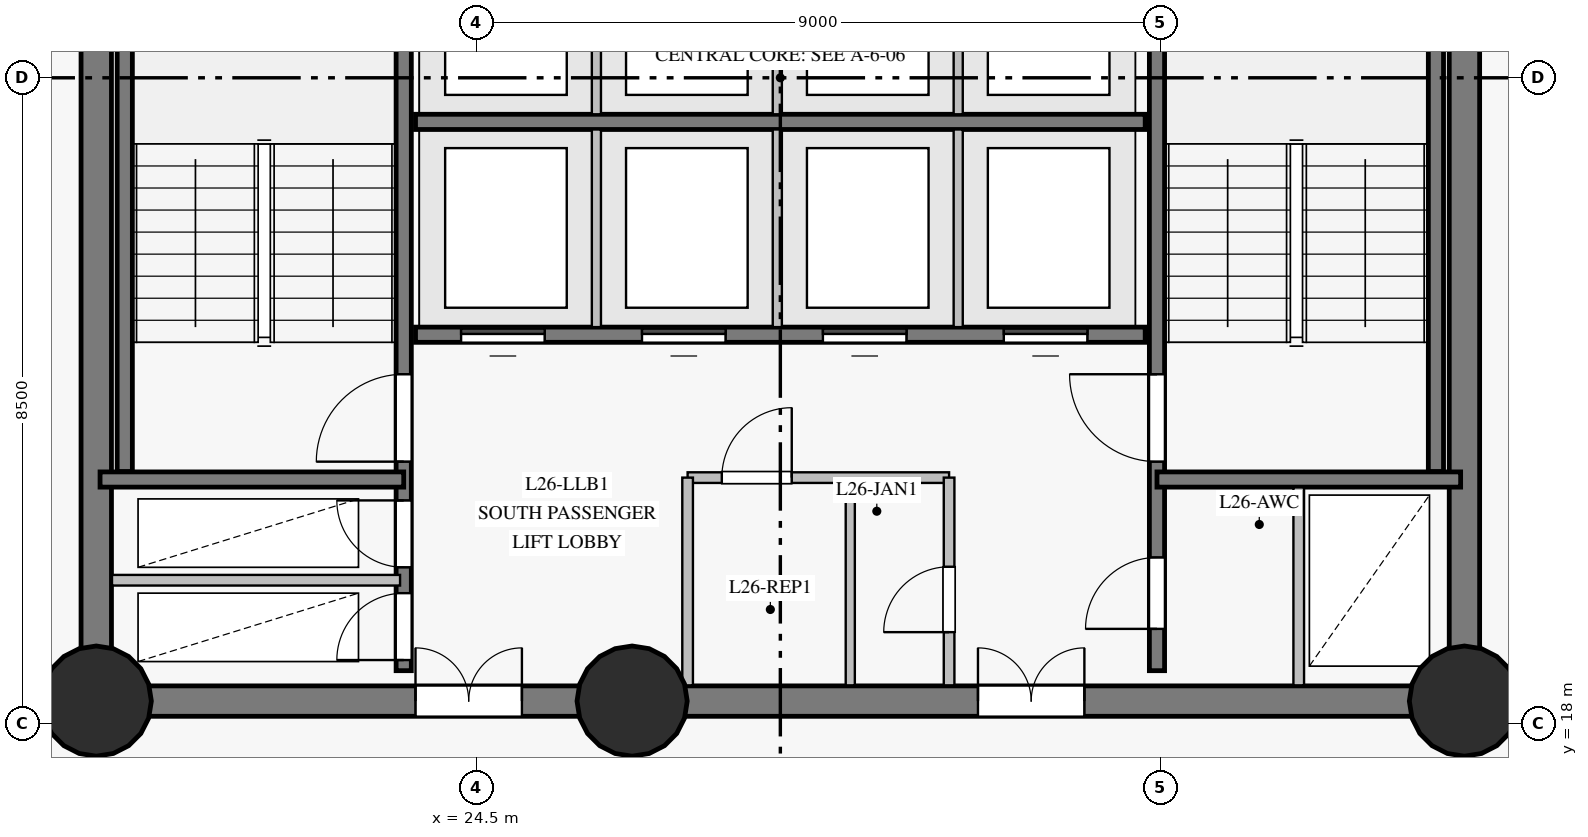
"""IFC4 building model, lengths in metres.
Left out: names, types, materials, properties, quantities, classifications, styles, units other than length and angle.
Written with IfcOpenShell. Run it as: python <this file> out.ifc"""

import sys

from ifc_helpers import new_model, si_unit, direction, frame, frame_2d, origin, origin_with_axes, origin_2d, place, context, subcontext, project, spatial, rectangle, circle, extrude, source, transform, mapped, element, fill, save


model = new_model("IFC4")
c1 = context("Model", 3, precision=1e-05, world=origin(), true_north=direction((0.0, 1.0)))
c2 = subcontext(c1, "Body", "Model", "MODEL_VIEW")
j1 = project(units=[si_unit("LENGTHUNIT", "METRE"), si_unit("PLANEANGLEUNIT", "RADIAN")], contexts=[c1])
p1 = place(None, origin())
s1 = spatial("IfcSite", under=j1, at=p1, CompositionType="ELEMENT")
p2 = place(p1, origin())
s2 = spatial("IfcBuilding", under=s1, at=p2, CompositionType="ELEMENT")
p3 = place(p2, frame((0.0, 0.0, 99.25)))
s3 = spatial("IfcBuildingStorey", under=s2, at=p3, CompositionType="ELEMENT", Elevation=99.25)
p4 = place(p3, frame((19.5, 18.3, 0.0), z_axis=(0.0, 0.0, 1.0), x_axis=(1.0, 0.0, 0.0)))
e1 = element("IfcWall", 1, at=p4, inside=s3, PredefinedType="SHEAR", context=c2, shape_type="SweptSolid", body=[
    extrude(rectangle(XDim=7.05, YDim=0.4, at=frame_2d((3.525, 0.0))), origin(), (0.0, 0.0, 1.0), 2.825),
])
p5 = place(p4, frame((4.2, 0.0, 0.0)))
e2 = element("IfcOpeningElement", 2, at=p5, cuts=e1, PredefinedType="OPENING", context=c2, shape_type="SweptSolid", body=[
    extrude(rectangle(XDim=1.4, YDim=2.2, at=frame_2d((0.7, 1.1))), frame((0.0, 0.21, 0.0), z_axis=(0.0, -1.0, 0.0), x_axis=(1.0, 0.0, 0.0)), (0.0, 0.0, 1.0), 0.42),
])
p6 = place(p3, frame((26.55, 18.3, 0.0), z_axis=(0.0, 0.0, 1.0), x_axis=(1.0, 0.0, 0.0)))
e3 = element("IfcWall", 3, at=p6, inside=s3, PredefinedType="SHEAR", context=c2, shape_type="SweptSolid", body=[
    extrude(rectangle(XDim=10.95, YDim=0.4, at=frame_2d((5.475, 0.0))), origin(), (0.0, 0.0, 1.0), 2.825),
])
p7 = place(p6, frame((4.55, 0.0, 0.0)))
e4 = element("IfcOpeningElement", 4, at=p7, cuts=e3, PredefinedType="OPENING", context=c2, shape_type="SweptSolid", body=[
    extrude(rectangle(XDim=1.4, YDim=2.2, at=frame_2d((0.7, 1.1))), frame((0.0, 0.21, 0.0), z_axis=(0.0, -1.0, 0.0), x_axis=(1.0, 0.0, 0.0)), (0.0, 0.0, 1.0), 0.42),
])
p8 = place(p3, frame((37.5, 18.3, 0.0), z_axis=(0.0, 0.0, 1.0), x_axis=(0.0, 1.0, 0.0)))
e5 = element("IfcWall", 5, at=p8, inside=s3, PredefinedType="SHEAR", context=c2, shape_type="SweptSolid", body=[
    extrude(rectangle(XDim=16.4, YDim=0.4, at=frame_2d((8.2, 0.0))), origin(), (0.0, 0.0, 1.0), 2.825),
])
p9 = place(p8, frame((14.15, 0.0, 0.0)))
e6 = element("IfcOpeningElement", 6, at=p9, cuts=e5, PredefinedType="OPENING", context=c2, shape_type="SweptSolid", body=[
    extrude(rectangle(XDim=1.2, YDim=2.15, at=frame_2d((0.6, 1.075))), frame((0.0, 0.21, 0.0), z_axis=(0.0, -1.0, 0.0), x_axis=(1.0, 0.0, 0.0)), (0.0, 0.0, 1.0), 0.42),
])
p10 = place(p3, frame((19.5, 34.7, 0.0), z_axis=(0.0, 0.0, 1.0), x_axis=(0.0, -1.0, 0.0)))
e7 = element("IfcWall", 7, at=p10, inside=s3, PredefinedType="SHEAR", context=c2, shape_type="SweptSolid", body=[
    extrude(rectangle(XDim=16.4, YDim=0.4, at=frame_2d((8.2, 0.0))), origin(), (0.0, 0.0, 1.0), 2.825),
])
p11 = place(p10, frame((3.1, 0.0, 0.0)))
e8 = element("IfcOpeningElement", 8, at=p11, cuts=e7, PredefinedType="OPENING", context=c2, shape_type="SweptSolid", body=[
    extrude(rectangle(XDim=1.1, YDim=2.15, at=frame_2d((0.55, 1.075))), frame((0.0, 0.21, 0.0), z_axis=(0.0, -1.0, 0.0), x_axis=(1.0, 0.0, 0.0)), (0.0, 0.0, 1.0), 0.42),
])
m1 = source(origin_with_axes(), c2, "Body", "SweptSolid", [
    extrude(circle(Radius=0.725, at=origin_2d()), origin(), (0.0, 0.0, 1.0), 3.05),
])
for number, where, z_axis, x_axis in (
    (9, (19.5, 18.3, 0.0), (0.0, 0.0, 1.0), (1.0, 0.0, 0.0)),
    (10, (26.55, 18.3, 0.0), (0.0, 0.0, 1.0), (1.0, 0.0, 0.0)),
    (11, (37.5, 18.3, 0.0), (0.0, 0.0, 1.0), (1.0, 0.0, 0.0)),
):
    element("IfcColumn", number, at=place(p3, frame(where, z_axis=z_axis, x_axis=x_axis)), inside=s3, PredefinedType="COLUMN", context=c2, shape_type="MappedRepresentation", body=[
        mapped(m1, transform((0.0, 0.0, 0.0), scale=1.0)),
    ])
p12 = place(p3, frame((23.545, 18.7, 0.0), z_axis=(0.0, 0.0, 1.0), x_axis=(0.0, 1.0, 0.0)))
e12 = element("IfcWall", 12, at=p12, inside=s3, PredefinedType="SHEAR", context=c2, shape_type="SweptSolid", body=[
    extrude(rectangle(XDim=15.6, YDim=0.2, at=frame_2d((7.8, 0.0))), origin(), (0.0, 0.0, 1.0), 2.825),
])
p13 = place(p12, frame((2.75, 0.0, 0.0)))
e13 = element("IfcOpeningElement", 13, at=p13, cuts=e12, PredefinedType="OPENING", context=c2, shape_type="SweptSolid", body=[
    extrude(rectangle(XDim=1.15, YDim=2.15, at=frame_2d((0.575, 1.075))), frame((0.0, 0.11, 0.0), z_axis=(0.0, -1.0, 0.0), x_axis=(1.0, 0.0, 0.0)), (0.0, 0.0, 1.0), 0.22),
])
p14 = place(p12, frame((0.14, 0.0, 0.0)))
e14 = element("IfcOpeningElement", 14, at=p14, cuts=e12, PredefinedType="OPENING", context=c2, shape_type="SweptSolid", body=[
    extrude(rectangle(XDim=0.88, YDim=2.1, at=frame_2d((0.44, 1.05))), frame((0.0, 0.11, 0.0), z_axis=(0.0, -1.0, 0.0), x_axis=(1.0, 0.0, 0.0)), (0.0, 0.0, 1.0), 0.22),
])
p15 = place(p12, frame((1.36, 0.0, 0.0)))
e15 = element("IfcOpeningElement", 15, at=p15, cuts=e12, PredefinedType="OPENING", context=c2, shape_type="SweptSolid", body=[
    extrude(rectangle(XDim=0.88, YDim=2.1, at=frame_2d((0.44, 1.05))), frame((0.0, 0.11, 0.0), z_axis=(0.0, -1.0, 0.0), x_axis=(1.0, 0.0, 0.0)), (0.0, 0.0, 1.0), 0.22),
])
p16 = place(p12, frame((12.1, 0.0, 0.0)))
e16 = element("IfcOpeningElement", 16, at=p16, cuts=e12, PredefinedType="OPENING", context=c2, shape_type="SweptSolid", body=[
    extrude(rectangle(XDim=1.12, YDim=2.15, at=frame_2d((0.56, 1.075))), frame((0.0, 0.11, 0.0), z_axis=(0.0, -1.0, 0.0), x_axis=(1.0, 0.0, 0.0)), (0.0, 0.0, 1.0), 0.22),
])
p17 = place(p12, frame((14.05, 0.0, 0.0)))
e17 = element("IfcOpeningElement", 17, at=p17, cuts=e12, PredefinedType="OPENING", context=c2, shape_type="SweptSolid", body=[
    extrude(rectangle(XDim=1.12, YDim=2.15, at=frame_2d((0.56, 1.075))), frame((0.0, 0.11, 0.0), z_axis=(0.0, -1.0, 0.0), x_axis=(1.0, 0.0, 0.0)), (0.0, 0.0, 1.0), 0.22),
])
p18 = place(p3, frame((33.455, 18.7, 0.0), z_axis=(0.0, 0.0, 1.0), x_axis=(0.0, 1.0, 0.0)))
e18 = element("IfcWall", 18, at=p18, inside=s3, PredefinedType="SHEAR", context=c2, shape_type="SweptSolid", body=[
    extrude(rectangle(XDim=15.6, YDim=0.2, at=frame_2d((7.8, 0.0))), origin(), (0.0, 0.0, 1.0), 2.825),
])
p19 = place(p18, frame((2.75, 0.0, 0.0)))
e19 = element("IfcOpeningElement", 19, at=p19, cuts=e18, PredefinedType="OPENING", context=c2, shape_type="SweptSolid", body=[
    extrude(rectangle(XDim=1.15, YDim=2.15, at=frame_2d((0.575, 1.075))), frame((0.0, 0.11, 0.0), z_axis=(0.0, -1.0, 0.0), x_axis=(1.0, 0.0, 0.0)), (0.0, 0.0, 1.0), 0.22),
])
p20 = place(p18, frame((0.55, 0.0, 0.0)))
e20 = element("IfcOpeningElement", 20, at=p20, cuts=e18, PredefinedType="OPENING", context=c2, shape_type="SweptSolid", body=[
    extrude(rectangle(XDim=0.94, YDim=2.1, at=frame_2d((0.47, 1.05))), frame((0.0, 0.11, 0.0), z_axis=(0.0, -1.0, 0.0), x_axis=(1.0, 0.0, 0.0)), (0.0, 0.0, 1.0), 0.22),
])
p21 = place(p3, frame((23.7, 23.12, 0.0), z_axis=(0.0, 0.0, 1.0), x_axis=(1.0, 0.0, 0.0)))
e21 = element("IfcWall", 21, at=p21, inside=s3, PredefinedType="SHEAR", context=c2, shape_type="SweptSolid", body=[
    extrude(rectangle(XDim=9.6, YDim=0.2, at=frame_2d((4.8, 0.0))), origin(), (0.0, 0.0, 1.0), 2.825),
])
p22 = place(p21, frame((0.6, 0.0, 0.0)))
e22 = element("IfcOpeningElement", 22, at=p22, cuts=e21, PredefinedType="OPENING", context=c2, shape_type="SweptSolid", body=[
    extrude(rectangle(XDim=1.1, YDim=2.15, at=frame_2d((0.55, 1.075))), frame((0.0, 0.11, 0.0), z_axis=(0.0, -1.0, 0.0), x_axis=(1.0, 0.0, 0.0)), (0.0, 0.0, 1.0), 0.22),
])
p23 = place(p21, frame((2.98, 0.0, 0.0)))
e23 = element("IfcOpeningElement", 23, at=p23, cuts=e21, PredefinedType="OPENING", context=c2, shape_type="SweptSolid", body=[
    extrude(rectangle(XDim=1.1, YDim=2.15, at=frame_2d((0.55, 1.075))), frame((0.0, 0.11, 0.0), z_axis=(0.0, -1.0, 0.0), x_axis=(1.0, 0.0, 0.0)), (0.0, 0.0, 1.0), 0.22),
])
p24 = place(p21, frame((5.36, 0.0, 0.0)))
e24 = element("IfcOpeningElement", 24, at=p24, cuts=e21, PredefinedType="OPENING", context=c2, shape_type="SweptSolid", body=[
    extrude(rectangle(XDim=1.1, YDim=2.15, at=frame_2d((0.55, 1.075))), frame((0.0, 0.11, 0.0), z_axis=(0.0, -1.0, 0.0), x_axis=(1.0, 0.0, 0.0)), (0.0, 0.0, 1.0), 0.22),
])
p25 = place(p21, frame((7.74, 0.0, 0.0)))
e25 = element("IfcOpeningElement", 25, at=p25, cuts=e21, PredefinedType="OPENING", context=c2, shape_type="SweptSolid", body=[
    extrude(rectangle(XDim=1.1, YDim=2.15, at=frame_2d((0.55, 1.075))), frame((0.0, 0.11, 0.0), z_axis=(0.0, -1.0, 0.0), x_axis=(1.0, 0.0, 0.0)), (0.0, 0.0, 1.0), 0.22),
])
p26 = place(p3, frame((23.7, 25.92, 0.0), z_axis=(0.0, 0.0, 1.0), x_axis=(1.0, 0.0, 0.0)))
e26 = element("IfcWall", 26, at=p26, inside=s3, PredefinedType="SHEAR", context=c2, shape_type="SweptSolid", body=[
    extrude(rectangle(XDim=9.6, YDim=0.2, at=frame_2d((4.8, 0.0))), origin(), (0.0, 0.0, 1.0), 2.825),
])
for number, where, z_axis, x_axis in (
    (27, (19.875, 21.32, 0.0), (0.0, 0.0, 1.0), (0.0, 1.0, 0.0)),
    (28, (37.125, 21.32, 0.0), (0.0, 0.0, 1.0), (0.0, 1.0, 0.0)),
):
    element("IfcWall", number, at=place(p3, frame(where, z_axis=z_axis, x_axis=x_axis)), inside=s3, PredefinedType="SHEAR", context=c2, shape_type="SweptSolid", body=[
        extrude(rectangle(XDim=7.5, YDim=0.2, at=frame_2d((3.75, 0.0))), origin(), (0.0, 0.0, 1.0), 2.825),
    ])
for number, where, z_axis, x_axis in (
    (29, (33.455, 21.215, 0.0), (0.0, 0.0, 1.0), (1.0, 0.0, 0.0)),
    (30, (19.55, 21.215, 0.0), (0.0, 0.0, 1.0), (1.0, 0.0, 0.0)),
):
    element("IfcWall", number, at=place(p3, frame(where, z_axis=z_axis, x_axis=x_axis)), inside=s3, PredefinedType="SHEAR", context=c2, shape_type="SweptSolid", body=[
        extrude(rectangle(XDim=3.995, YDim=0.2, at=frame_2d((1.998, 0.0))), origin(), (0.0, 0.0, 1.0), 2.825),
    ])
p27 = place(p3, frame((19.707, 19.89, 0.0), z_axis=(0.0, 0.0, 1.0), x_axis=(1.0, 0.0, 0.0)))
e31 = element("IfcWall", 31, at=p27, inside=s3, PredefinedType="PARTITIONING", context=c2, shape_type="SweptSolid", body=[
    extrude(rectangle(XDim=3.79, YDim=0.14, at=frame_2d((1.895, 0.0))), origin(), (0.0, 0.0, 1.0), 2.825),
])
p28 = place(p3, frame((27.28, 21.24, 0.0), z_axis=(0.0, 0.0, 1.0), x_axis=(1.0, 0.0, 0.0)))
e32 = element("IfcWall", 32, at=p28, inside=s3, PredefinedType="PARTITIONING", context=c2, shape_type="SweptSolid", body=[
    extrude(rectangle(XDim=3.44, YDim=0.14, at=frame_2d((1.72, 0.0))), origin(), (0.0, 0.0, 1.0), 2.825),
])
p29 = place(p28, frame((0.45, 0.0, 0.0)))
e33 = element("IfcOpeningElement", 33, at=p29, cuts=e32, PredefinedType="OPENING", context=c2, shape_type="SweptSolid", body=[
    extrude(rectangle(XDim=0.92, YDim=2.1, at=frame_2d((0.46, 1.05))), frame((0.0, 0.08, 0.0), z_axis=(0.0, -1.0, 0.0), x_axis=(1.0, 0.0, 0.0)), (0.0, 0.0, 1.0), 0.16),
])
p30 = place(p3, frame((27.28, 18.507, 0.0), z_axis=(0.0, 0.0, 1.0), x_axis=(0.0, 1.0, 0.0)))
e34 = element("IfcWall", 34, at=p30, inside=s3, PredefinedType="PARTITIONING", context=c2, shape_type="SweptSolid", body=[
    extrude(rectangle(XDim=2.733, YDim=0.14, at=frame_2d((1.366, 0.0))), origin(), (0.0, 0.0, 1.0), 2.825),
])
p31 = place(p3, frame((30.72, 18.507, 0.0), z_axis=(0.0, 0.0, 1.0), x_axis=(0.0, 1.0, 0.0)))
e35 = element("IfcWall", 35, at=p31, inside=s3, PredefinedType="PARTITIONING", context=c2, shape_type="SweptSolid", body=[
    extrude(rectangle(XDim=2.733, YDim=0.14, at=frame_2d((1.366, 0.0))), origin(), (0.0, 0.0, 1.0), 2.825),
])
p32 = place(p31, frame((0.7, 0.0, 0.0)))
e36 = element("IfcOpeningElement", 36, at=p32, cuts=e35, PredefinedType="OPENING", context=c2, shape_type="SweptSolid", body=[
    extrude(rectangle(XDim=0.86, YDim=2.1, at=frame_2d((0.43, 1.05))), frame((0.0, 0.08, 0.0), z_axis=(0.0, -1.0, 0.0), x_axis=(1.0, 0.0, 0.0)), (0.0, 0.0, 1.0), 0.16),
])
for number, where, z_axis, x_axis in (
    (37, (26.08, 23.22, 0.0), (0.0, 0.0, 1.0), (0.0, 1.0, 0.0)),
    (38, (28.46, 23.22, 0.0), (0.0, 0.0, 1.0), (0.0, 1.0, 0.0)),
    (39, (30.84, 23.22, 0.0), (0.0, 0.0, 1.0), (0.0, 1.0, 0.0)),
    (40, (26.08, 26.02, 0.0), (0.0, 0.0, 1.0), (0.0, 1.0, 0.0)),
    (41, (28.46, 26.02, 0.0), (0.0, 0.0, 1.0), (0.0, 1.0, 0.0)),
    (42, (30.84, 26.02, 0.0), (0.0, 0.0, 1.0), (0.0, 1.0, 0.0)),
):
    element("IfcWall", number, at=place(p3, frame(where, z_axis=z_axis, x_axis=x_axis)), inside=s3, PredefinedType="PARTITIONING", context=c2, shape_type="SweptSolid", body=[
        extrude(rectangle(XDim=2.6, YDim=0.12, at=frame_2d((1.3, 0.0))), origin(), (0.0, 0.0, 1.0), 2.825),
    ])
p33 = place(p3, frame((29.42, 18.507, 0.0), z_axis=(0.0, 0.0, 1.0), x_axis=(0.0, 1.0, 0.0)))
e43 = element("IfcWall", 43, at=p33, inside=s3, PredefinedType="PARTITIONING", context=c2, shape_type="SweptSolid", body=[
    extrude(rectangle(XDim=2.662, YDim=0.12, at=frame_2d((1.331, 0.0))), origin(), (0.0, 0.0, 1.0), 2.825),
])
p34 = place(p3, frame((35.32, 18.507, 0.0), z_axis=(0.0, 0.0, 1.0), x_axis=(0.0, 1.0, 0.0)))
e44 = element("IfcWall", 44, at=p34, inside=s3, PredefinedType="PARTITIONING", context=c2, shape_type="SweptSolid", body=[
    extrude(rectangle(XDim=2.604, YDim=0.14, at=frame_2d((1.302, 0.0))), origin(), (0.0, 0.0, 1.0), 2.825),
])
m2 = source(origin_with_axes(), c2, "Body", "SweptSolid", [
    extrude(rectangle(XDim=1.15, YDim=2.15, at=frame_2d((0.575, 1.075))), frame((0.0, 0.025, 0.0), z_axis=(0.0, -1.0, 0.0), x_axis=(1.0, 0.0, 0.0)), (0.0, 0.0, 1.0), 0.05),
])
p35 = place(p13, origin())
e45 = element("IfcDoor", 45, at=p35, inside=s3, OperationType="SINGLE_SWING_LEFT", PredefinedType="DOOR", context=c2, shape_type="MappedRepresentation", body=[
    mapped(m2, transform((0.0, 0.0, 0.0), scale=1.0)),
])
fill(e13, e45)
p36 = place(p19, origin())
e46 = element("IfcDoor", 46, at=p36, inside=s3, OperationType="SINGLE_SWING_RIGHT", PredefinedType="DOOR", context=c2, shape_type="MappedRepresentation", body=[
    mapped(m2, transform((0.0, 0.0, 0.0), scale=1.0)),
])
fill(e19, e46)
m3 = source(origin_with_axes(), c2, "Body", "SweptSolid", [
    extrude(rectangle(XDim=0.88, YDim=2.1, at=frame_2d((0.44, 1.05))), frame((0.0, 0.025, 0.0), z_axis=(0.0, -1.0, 0.0), x_axis=(1.0, 0.0, 0.0)), (0.0, 0.0, 1.0), 0.05),
])
p37 = place(p14, origin())
e47 = element("IfcDoor", 47, at=p37, inside=s3, OperationType="SINGLE_SWING_LEFT", PredefinedType="DOOR", context=c2, shape_type="MappedRepresentation", body=[
    mapped(m3, transform((0.0, 0.0, 0.0), scale=1.0)),
])
fill(e14, e47)
p38 = place(p15, origin())
e48 = element("IfcDoor", 48, at=p38, inside=s3, OperationType="SINGLE_SWING_RIGHT", PredefinedType="DOOR", context=c2, shape_type="MappedRepresentation", body=[
    mapped(m3, transform((0.0, 0.0, 0.0), scale=1.0)),
])
fill(e15, e48)
m4 = source(origin_with_axes(), c2, "Body", "SweptSolid", [
    extrude(rectangle(XDim=1.4, YDim=2.2, at=frame_2d((0.7, 1.1))), frame((0.0, 0.025, 0.0), z_axis=(0.0, -1.0, 0.0), x_axis=(1.0, 0.0, 0.0)), (0.0, 0.0, 1.0), 0.05),
])
p39 = place(p5, origin())
e49 = element("IfcDoor", 49, at=p39, inside=s3, OperationType="DOUBLE_DOOR_SINGLE_SWING", PredefinedType="DOOR", context=c2, shape_type="MappedRepresentation", body=[
    mapped(m4, transform((0.0, 0.0, 0.0), scale=1.0)),
])
fill(e2, e49)
p40 = place(p7, origin())
e50 = element("IfcDoor", 50, at=p40, inside=s3, OperationType="DOUBLE_DOOR_SINGLE_SWING", PredefinedType="DOOR", context=c2, shape_type="MappedRepresentation", body=[
    mapped(m4, transform((0.0, 0.0, 0.0), scale=1.0)),
])
fill(e4, e50)
m5 = source(origin_with_axes(), c2, "Body", "SweptSolid", [
    extrude(rectangle(XDim=0.94, YDim=2.1, at=frame_2d((0.47, 1.05))), frame((0.0, 0.025, 0.0), z_axis=(0.0, -1.0, 0.0), x_axis=(1.0, 0.0, 0.0)), (0.0, 0.0, 1.0), 0.05),
])
p41 = place(p20, origin())
e51 = element("IfcDoor", 51, at=p41, inside=s3, OperationType="SINGLE_SWING_LEFT", PredefinedType="DOOR", context=c2, shape_type="MappedRepresentation", body=[
    mapped(m5, transform((0.0, 0.0, 0.0), scale=1.0)),
])
fill(e20, e51)
m6 = source(origin_with_axes(), c2, "Body", "SweptSolid", [
    extrude(rectangle(XDim=0.92, YDim=2.1, at=frame_2d((0.46, 1.05))), frame((0.0, 0.025, 0.0), z_axis=(0.0, -1.0, 0.0), x_axis=(1.0, 0.0, 0.0)), (0.0, 0.0, 1.0), 0.05),
])
p42 = place(p29, origin())
e52 = element("IfcDoor", 52, at=p42, inside=s3, OperationType="SINGLE_SWING_RIGHT", PredefinedType="DOOR", context=c2, shape_type="MappedRepresentation", body=[
    mapped(m6, transform((0.0, 0.0, 0.0), scale=1.0)),
])
fill(e33, e52)
m7 = source(origin_with_axes(), c2, "Body", "SweptSolid", [
    extrude(rectangle(XDim=0.86, YDim=2.1, at=frame_2d((0.43, 1.05))), frame((0.0, 0.025, 0.0), z_axis=(0.0, -1.0, 0.0), x_axis=(1.0, 0.0, 0.0)), (0.0, 0.0, 1.0), 0.05),
])
p43 = place(p32, origin())
e53 = element("IfcDoor", 53, at=p43, inside=s3, OperationType="SINGLE_SWING_LEFT", PredefinedType="DOOR", context=c2, shape_type="MappedRepresentation", body=[
    mapped(m7, transform((0.0, 0.0, 0.0), scale=1.0)),
])
fill(e36, e53)
m8 = source(origin_with_axes(), c2, "Body", "SweptSolid", [
    extrude(rectangle(XDim=1.1, YDim=2.15, at=frame_2d((0.55, 1.075))), frame((0.0, 0.025, 0.0), z_axis=(0.0, -1.0, 0.0), x_axis=(1.0, 0.0, 0.0)), (0.0, 0.0, 1.0), 0.05),
])
p44 = place(p22, origin())
e54 = element("IfcDoor", 54, at=p44, inside=s3, OperationType="SLIDING_TO_LEFT", PredefinedType="DOOR", context=c2, shape_type="MappedRepresentation", body=[
    mapped(m8, transform((0.0, 0.0, 0.0), scale=1.0)),
])
fill(e22, e54)
p45 = place(p23, origin())
e55 = element("IfcDoor", 55, at=p45, inside=s3, OperationType="SLIDING_TO_RIGHT", PredefinedType="DOOR", context=c2, shape_type="MappedRepresentation", body=[
    mapped(m8, transform((0.0, 0.0, 0.0), scale=1.0)),
])
fill(e23, e55)
p46 = place(p24, origin())
e56 = element("IfcDoor", 56, at=p46, inside=s3, OperationType="SLIDING_TO_LEFT", PredefinedType="DOOR", context=c2, shape_type="MappedRepresentation", body=[
    mapped(m8, transform((0.0, 0.0, 0.0), scale=1.0)),
])
fill(e24, e56)
p47 = place(p25, origin())
e57 = element("IfcDoor", 57, at=p47, inside=s3, OperationType="SLIDING_TO_RIGHT", PredefinedType="DOOR", context=c2, shape_type="MappedRepresentation", body=[
    mapped(m8, transform((0.0, 0.0, 0.0), scale=1.0)),
])
fill(e25, e57)
save(model, sys.argv[1])
